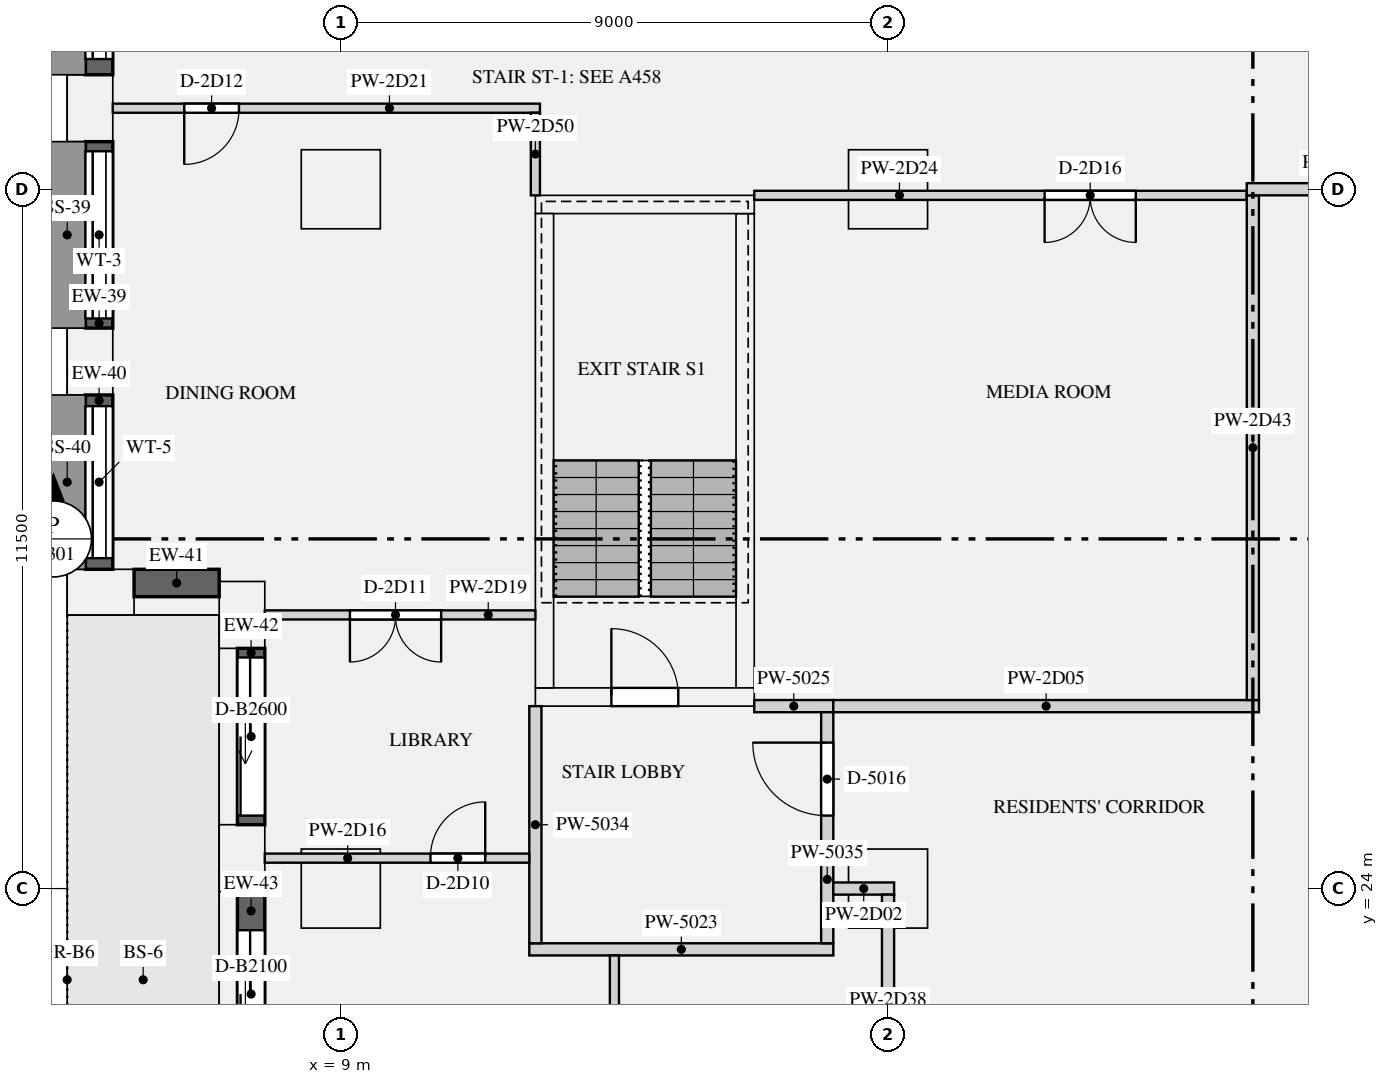
"""IFC4 building model, lengths in metres.
Left out: names, types, materials, properties, quantities, classifications, styles, units other than length and angle.
Written with IfcOpenShell. Run it as: python <this file> out.ifc"""

import sys

from ifc_helpers import new_model, si_unit, direction, frame, frame_2d, origin, origin_2d, place, context, subcontext, project, spatial, rectangle, extrude, element, fill, save


model = new_model("IFC4")
c1 = context("Model", 3, precision=1e-05, world=origin(), true_north=direction((0.0, 1.0)))
c2 = subcontext(c1, "Body", "Model", "MODEL_VIEW")
j1 = project(units=[si_unit("LENGTHUNIT", "METRE"), si_unit("PLANEANGLEUNIT", "RADIAN")], contexts=[c1])
p1 = place(None, origin())
s1 = spatial("IfcSite", under=j1, at=p1, CompositionType="ELEMENT")
p2 = place(p1, origin())
s2 = spatial("IfcBuilding", under=s1, at=p2, CompositionType="ELEMENT")
p3 = place(p2, frame((0.0, 0.0, 111.9)))
s3 = spatial("IfcBuildingStorey", under=s2, at=p3, CompositionType="ELEMENT", Elevation=111.9)
for number, where, z_axis, x_axis in (
    (1, (4.875, 36.833, 0.0), (0.0, 0.0, 1.0), (0.0, -1.0, 0.0)),
    (2, (4.875, 32.667, 0.0), (0.0, 0.0, 1.0), (0.0, -1.0, 0.0)),
    (3, (5.05, 28.875, 0.0), (0.0, 0.0, 1.0), (1.0, 0.0, 0.0)),
    (4, (7.375, 28.5, 0.0), (0.0, 0.0, 1.0), (0.0, -1.0, 0.0)),
    (5, (7.375, 24.5, 0.0), (0.0, 0.0, 1.0), (0.0, -1.0, 0.0)),
):
    element("IfcColumn", number, at=place(p3, frame(where, z_axis=z_axis, x_axis=x_axis)), inside=s3, PredefinedType="USERDEFINED", context=c2, shape_type="SweptSolid", body=[
        extrude(rectangle(XDim=1.1, YDim=0.75, at=origin_2d()), origin(), (0.0, 0.0, 1.0), 3.15),
    ])
for number, where, z_axis, x_axis in (
    (6, (9.0, 24.0, 0.0), (0.0, 0.0, 1.0), (1.0, 0.0, 0.0)),
    (7, (18.0, 24.0, 0.0), (0.0, 0.0, 1.0), (1.0, 0.0, 0.0)),
    (8, (9.0, 35.5, 0.0), (0.0, 0.0, 1.0), (1.0, 0.0, 0.0)),
    (9, (18.0, 35.5, 0.0), (0.0, 0.0, 1.0), (1.0, 0.0, 0.0)),
):
    element("IfcColumn", number, at=place(p3, frame(where, z_axis=z_axis, x_axis=x_axis)), inside=s3, PredefinedType="COLUMN", context=c2, shape_type="SweptSolid", body=[
        extrude(rectangle(XDim=1.3, YDim=1.3, at=origin_2d()), origin(), (0.0, 0.0, 1.0), 3.15),
    ])
p4 = place(p3, frame((12.2, 27.15, 0.0), z_axis=(0.0, 0.0, 1.0), x_axis=(1.0, 0.0, 0.0)))
e10 = element("IfcWall", 10, at=p4, inside=s3, PredefinedType="SHEAR", context=c2, shape_type="SweptSolid", body=[
    extrude(rectangle(XDim=3.6, YDim=0.3, at=frame_2d((1.8, 0.0))), origin(), (0.0, 0.0, 1.0), 3.15),
])
p5 = place(p4, frame((1.25, 0.0, 0.0)))
e11 = element("IfcOpeningElement", 11, at=p5, cuts=e10, PredefinedType="OPENING", context=c2, shape_type="SweptSolid", body=[
    extrude(rectangle(XDim=1.1, YDim=2.1, at=frame_2d((0.55, 1.05))), frame((0.0, 0.16, 0.0), z_axis=(0.0, -1.0, 0.0), x_axis=(1.0, 0.0, 0.0)), (0.0, 0.0, 1.0), 0.32),
])
p6 = place(p3, frame((12.2, 35.25, 0.0), z_axis=(0.0, 0.0, 1.0), x_axis=(1.0, 0.0, 0.0)))
e12 = element("IfcWall", 12, at=p6, inside=s3, PredefinedType="SHEAR", context=c2, shape_type="SweptSolid", body=[
    extrude(rectangle(XDim=3.6, YDim=0.3, at=frame_2d((1.8, 0.0))), origin(), (0.0, 0.0, 1.0), 3.15),
])
for number, where, z_axis, x_axis in (
    (13, (12.35, 27.3, 0.0), (0.0, 0.0, 1.0), (0.0, 1.0, 0.0)),
    (14, (15.65, 27.3, 0.0), (0.0, 0.0, 1.0), (0.0, 1.0, 0.0)),
):
    element("IfcWall", number, at=place(p3, frame(where, z_axis=z_axis, x_axis=x_axis)), inside=s3, PredefinedType="SHEAR", context=c2, shape_type="SweptSolid", body=[
        extrude(rectangle(XDim=7.8, YDim=0.3, at=frame_2d((3.9, 0.0))), origin(), (0.0, 0.0, 1.0), 3.15),
    ])
p7 = place(p3, frame((5.025, 39.9, 0.9), z_axis=(0.0, 0.0, 1.0), x_axis=(0.0, -1.0, 0.0)))
e15 = element("IfcWall", 15, at=p7, inside=s3, PredefinedType="SOLIDWALL", context=c2, shape_type="SweptSolid", body=[
    extrude(rectangle(XDim=2.517, YDim=0.45, at=frame_2d((1.258, 0.0))), origin(), (0.0, 0.0, 1.0), 1.93),
])
p8 = place(p7, frame((0.259, 0.0, 0.15)))
e16 = element("IfcOpeningElement", 16, at=p8, cuts=e15, PredefinedType="OPENING", context=c2, shape_type="SweptSolid", body=[
    extrude(rectangle(XDim=2.0, YDim=1.5, at=frame_2d((1.0, 0.75))), frame((0.0, 0.235, 0.0), z_axis=(0.0, -1.0, 0.0), x_axis=(1.0, 0.0, 0.0)), (0.0, 0.0, 1.0), 0.47),
])
p9 = place(p3, frame((5.025, 36.283, 0.9), z_axis=(0.0, 0.0, 1.0), x_axis=(0.0, -1.0, 0.0)))
e17 = element("IfcWall", 17, at=p9, inside=s3, PredefinedType="SOLIDWALL", context=c2, shape_type="SweptSolid", body=[
    extrude(rectangle(XDim=3.066, YDim=0.45, at=frame_2d((1.533, 0.0))), origin(), (0.0, 0.0, 1.0), 1.93),
])
p10 = place(p9, frame((0.158, 0.0, 0.15)))
e18 = element("IfcOpeningElement", 18, at=p10, cuts=e17, PredefinedType="OPENING", context=c2, shape_type="SweptSolid", body=[
    extrude(rectangle(XDim=2.75, YDim=1.5, at=frame_2d((1.375, 0.75))), frame((0.0, 0.235, 0.0), z_axis=(0.0, -1.0, 0.0), x_axis=(1.0, 0.0, 0.0)), (0.0, 0.0, 1.0), 0.47),
])
p11 = place(p3, frame((5.025, 32.117, 0.9), z_axis=(0.0, 0.0, 1.0), x_axis=(0.0, -1.0, 0.0)))
e19 = element("IfcWall", 19, at=p11, inside=s3, PredefinedType="SOLIDWALL", context=c2, shape_type="SweptSolid", body=[
    extrude(rectangle(XDim=2.867, YDim=0.45, at=frame_2d((1.434, 0.0))), origin(), (0.0, 0.0, 1.0), 1.93),
])
p12 = place(p11, frame((0.184, 0.0, 0.15)))
e20 = element("IfcOpeningElement", 20, at=p12, cuts=e19, PredefinedType="OPENING", context=c2, shape_type="SweptSolid", body=[
    extrude(rectangle(XDim=2.5, YDim=1.5, at=frame_2d((1.25, 0.75))), frame((0.0, 0.235, 0.0), z_axis=(0.0, -1.0, 0.0), x_axis=(1.0, 0.0, 0.0)), (0.0, 0.0, 1.0), 0.47),
])
p13 = place(p3, frame((5.6, 29.025, 0.9), z_axis=(0.0, 0.0, 1.0), x_axis=(1.0, 0.0, 0.0)))
e21 = element("IfcWall", 21, at=p13, inside=s3, PredefinedType="SOLIDWALL", context=c2, shape_type="SweptSolid", body=[
    extrude(rectangle(XDim=1.4, YDim=0.45, at=frame_2d((0.7, 0.0))), origin(), (0.0, 0.0, 1.0), 1.93),
])
p14 = place(p3, frame((7.525, 27.95, 0.0), z_axis=(0.0, 0.0, 1.0), x_axis=(0.0, -1.0, 0.0)))
e22 = element("IfcWall", 22, at=p14, inside=s3, PredefinedType="SOLIDWALL", context=c2, shape_type="SweptSolid", body=[
    extrude(rectangle(XDim=2.9, YDim=0.45, at=frame_2d((1.45, 0.0))), origin(), (0.0, 0.0, 1.0), 2.83),
])
p15 = place(p14, frame((0.15, 0.0, 0.0)))
e23 = element("IfcOpeningElement", 23, at=p15, cuts=e22, PredefinedType="OPENING", context=c2, shape_type="SweptSolid", body=[
    extrude(rectangle(XDim=2.6, YDim=2.3, at=frame_2d((1.3, 1.15))), frame((0.0, 0.235, 0.0), z_axis=(0.0, -1.0, 0.0), x_axis=(1.0, 0.0, 0.0)), (0.0, 0.0, 1.0), 0.47),
])
p16 = place(p3, frame((7.525, 23.95, 0.0), z_axis=(0.0, 0.0, 1.0), x_axis=(0.0, -1.0, 0.0)))
e24 = element("IfcWall", 24, at=p16, inside=s3, PredefinedType="SOLIDWALL", context=c2, shape_type="SweptSolid", body=[
    extrude(rectangle(XDim=2.9, YDim=0.45, at=frame_2d((1.45, 0.0))), origin(), (0.0, 0.0, 1.0), 2.83),
])
p17 = place(p16, frame((0.635, 0.0, 0.0)))
e25 = element("IfcOpeningElement", 25, at=p17, cuts=e24, PredefinedType="OPENING", context=c2, shape_type="SweptSolid", body=[
    extrude(rectangle(XDim=2.1, YDim=2.3, at=frame_2d((1.05, 1.15))), frame((0.0, 0.235, 0.0), z_axis=(0.0, -1.0, 0.0), x_axis=(1.0, 0.0, 0.0)), (0.0, 0.0, 1.0), 0.47),
])
p18 = place(p3, frame((12.1, 23.0, 0.0), z_axis=(0.0, 0.0, 1.0), x_axis=(1.0, 0.0, 0.0)))
e26 = element("IfcWall", 26, at=p18, inside=s3, PredefinedType="PARTITIONING", context=c2, shape_type="SweptSolid", body=[
    extrude(rectangle(XDim=5.0, YDim=0.2, at=frame_2d((2.5, 0.0))), origin(), (0.0, 0.0, 1.0), 2.83),
])
p19 = place(p3, frame((15.8, 27.0, 0.0), z_axis=(0.0, 0.0, 1.0), x_axis=(1.0, 0.0, 0.0)))
e27 = element("IfcWall", 27, at=p19, inside=s3, PredefinedType="PARTITIONING", context=c2, shape_type="SweptSolid", body=[
    extrude(rectangle(XDim=1.3, YDim=0.2, at=frame_2d((0.65, 0.0))), origin(), (0.0, 0.0, 1.0), 2.83),
])
p20 = place(p3, frame((12.2, 23.1, 0.0), z_axis=(0.0, 0.0, 1.0), x_axis=(0.0, 1.0, 0.0)))
e28 = element("IfcWall", 28, at=p20, inside=s3, PredefinedType="PARTITIONING", context=c2, shape_type="SweptSolid", body=[
    extrude(rectangle(XDim=3.9, YDim=0.2, at=frame_2d((1.95, 0.0))), origin(), (0.0, 0.0, 1.0), 2.83),
])
p21 = place(p3, frame((17.0, 23.1, 0.0), z_axis=(0.0, 0.0, 1.0), x_axis=(0.0, 1.0, 0.0)))
e29 = element("IfcWall", 29, at=p21, inside=s3, PredefinedType="PARTITIONING", context=c2, shape_type="SweptSolid", body=[
    extrude(rectangle(XDim=3.8, YDim=0.2, at=frame_2d((1.9, 0.0))), origin(), (0.0, 0.0, 1.0), 2.83),
])
p22 = place(p21, frame((2.1, 0.0, 0.0)))
e30 = element("IfcOpeningElement", 30, at=p22, cuts=e29, PredefinedType="OPENING", context=c2, shape_type="SweptSolid", body=[
    extrude(rectangle(XDim=1.2, YDim=2.1, at=frame_2d((0.6, 1.05))), frame((0.0, 0.11, 0.0), z_axis=(0.0, -1.0, 0.0), x_axis=(1.0, 0.0, 0.0)), (0.0, 0.0, 1.0), 0.22),
])
p23 = place(p3, frame((17.1, 24.0, 0.0), z_axis=(0.0, 0.0, 1.0), x_axis=(1.0, 0.0, 0.0)))
e31 = element("IfcWall", 31, at=p23, inside=s3, PredefinedType="PARTITIONING", context=c2, shape_type="SweptSolid", body=[
    extrude(rectangle(XDim=1.0, YDim=0.2, at=frame_2d((0.5, 0.0))), origin(), (0.0, 0.0, 1.0), 2.83),
])
p24 = place(p3, frame((17.1, 27.0, 0.0), z_axis=(0.0, 0.0, 1.0), x_axis=(1.0, 0.0, 0.0)))
e32 = element("IfcWall", 32, at=p24, inside=s3, PredefinedType="PARTITIONING", context=c2, shape_type="SweptSolid", body=[
    extrude(rectangle(XDim=7.0, YDim=0.2, at=frame_2d((3.5, 0.0))), origin(), (0.0, 0.0, 1.0), 2.83),
])
p25 = place(p3, frame((23.9, 35.5, 0.0), z_axis=(0.0, 0.0, 1.0), x_axis=(1.0, 0.0, 0.0)))
e33 = element("IfcWall", 33, at=p25, inside=s3, PredefinedType="PARTITIONING", context=c2, shape_type="SweptSolid", body=[
    extrude(rectangle(XDim=3.1, YDim=0.2, at=frame_2d((1.55, 0.0))), origin(), (0.0, 0.0, 1.0), 2.83),
])
p26 = place(p3, frame((7.75, 24.5, 0.0), z_axis=(0.0, 0.0, 1.0), x_axis=(1.0, 0.0, 0.0)))
e34 = element("IfcWall", 34, at=p26, inside=s3, PredefinedType="PARTITIONING", context=c2, shape_type="SweptSolid", body=[
    extrude(rectangle(XDim=4.35, YDim=0.15, at=frame_2d((2.175, 0.0))), origin(), (0.0, 0.0, 1.0), 2.83),
])
p27 = place(p26, frame((2.725, 0.0, 0.0)))
e35 = element("IfcOpeningElement", 35, at=p27, cuts=e34, PredefinedType="OPENING", context=c2, shape_type="SweptSolid", body=[
    extrude(rectangle(XDim=0.9, YDim=2.1, at=frame_2d((0.45, 1.05))), frame((0.0, 0.085, 0.0), z_axis=(0.0, -1.0, 0.0), x_axis=(1.0, 0.0, 0.0)), (0.0, 0.0, 1.0), 0.17),
])
p28 = place(p3, frame((7.75, 28.5, 0.0), z_axis=(0.0, 0.0, 1.0), x_axis=(1.0, 0.0, 0.0)))
e36 = element("IfcWall", 36, at=p28, inside=s3, PredefinedType="PARTITIONING", context=c2, shape_type="SweptSolid", body=[
    extrude(rectangle(XDim=4.45, YDim=0.15, at=frame_2d((2.225, 0.0))), origin(), (0.0, 0.0, 1.0), 2.83),
])
p29 = place(p28, frame((1.4, 0.0, 0.0)))
e37 = element("IfcOpeningElement", 37, at=p29, cuts=e36, PredefinedType="OPENING", context=c2, shape_type="SweptSolid", body=[
    extrude(rectangle(XDim=1.5, YDim=2.1, at=frame_2d((0.75, 1.05))), frame((0.0, 0.085, 0.0), z_axis=(0.0, -1.0, 0.0), x_axis=(1.0, 0.0, 0.0)), (0.0, 0.0, 1.0), 0.17),
])
p30 = place(p3, frame((5.25, 36.833, 0.0), z_axis=(0.0, 0.0, 1.0), x_axis=(1.0, 0.0, 0.0)))
e38 = element("IfcWall", 38, at=p30, inside=s3, PredefinedType="PARTITIONING", context=c2, shape_type="SweptSolid", body=[
    extrude(rectangle(XDim=7.025, YDim=0.15, at=frame_2d((3.512, 0.0))), origin(), (0.0, 0.0, 1.0), 2.83),
])
p31 = place(p30, frame((1.175, 0.0, 0.0)))
e39 = element("IfcOpeningElement", 39, at=p31, cuts=e38, PredefinedType="OPENING", context=c2, shape_type="SweptSolid", body=[
    extrude(rectangle(XDim=0.9, YDim=2.1, at=frame_2d((0.45, 1.05))), frame((0.0, 0.085, 0.0), z_axis=(0.0, -1.0, 0.0), x_axis=(1.0, 0.0, 0.0)), (0.0, 0.0, 1.0), 0.17),
])
p32 = place(p3, frame((15.8, 35.4, 0.0), z_axis=(0.0, 0.0, 1.0), x_axis=(1.0, 0.0, 0.0)))
e40 = element("IfcWall", 40, at=p32, inside=s3, PredefinedType="PARTITIONING", context=c2, shape_type="SweptSolid", body=[
    extrude(rectangle(XDim=8.1, YDim=0.15, at=frame_2d((4.05, 0.0))), origin(), (0.0, 0.0, 1.0), 2.83),
])
p33 = place(p32, frame((4.775, 0.0, 0.0)))
e41 = element("IfcOpeningElement", 41, at=p33, cuts=e40, PredefinedType="OPENING", context=c2, shape_type="SweptSolid", body=[
    extrude(rectangle(XDim=1.5, YDim=2.1, at=frame_2d((0.75, 1.05))), frame((0.0, 0.085, 0.0), z_axis=(0.0, -1.0, 0.0), x_axis=(1.0, 0.0, 0.0)), (0.0, 0.0, 1.0), 0.17),
])
p34 = place(p3, frame((18.0, 16.1, 0.0), z_axis=(0.0, 0.0, 1.0), x_axis=(0.0, 1.0, 0.0)))
e42 = element("IfcWall", 42, at=p34, inside=s3, PredefinedType="PARTITIONING", context=c2, shape_type="SweptSolid", body=[
    extrude(rectangle(XDim=7.8, YDim=0.2, at=frame_2d((3.9, 0.0))), origin(), (0.0, 0.0, 1.0), 2.83),
])
p35 = place(p34, frame((2.35, 0.0, 0.0)))
e43 = element("IfcOpeningElement", 43, at=p35, cuts=e42, PredefinedType="OPENING", context=c2, shape_type="SweptSolid", body=[
    extrude(rectangle(XDim=1.1, YDim=2.1, at=frame_2d((0.55, 1.05))), frame((0.0, 0.11, 0.0), z_axis=(0.0, -1.0, 0.0), x_axis=(1.0, 0.0, 0.0)), (0.0, 0.0, 1.0), 0.22),
])
p36 = place(p3, frame((24.0, 27.1, 0.0), z_axis=(0.0, 0.0, 1.0), x_axis=(0.0, 1.0, 0.0)))
e44 = element("IfcWall", 44, at=p36, inside=s3, PredefinedType="PARTITIONING", context=c2, shape_type="SweptSolid", body=[
    extrude(rectangle(XDim=8.3, YDim=0.2, at=frame_2d((4.15, 0.0))), origin(), (0.0, 0.0, 1.0), 2.83),
])
p37 = place(p3, frame((13.5, 12.575, 0.0), z_axis=(0.0, 0.0, 1.0), x_axis=(0.0, 1.0, 0.0)))
e45 = element("IfcWall", 45, at=p37, inside=s3, PredefinedType="PARTITIONING", context=c2, shape_type="SweptSolid", body=[
    extrude(rectangle(XDim=10.325, YDim=0.15, at=frame_2d((5.163, 0.0))), origin(), (0.0, 0.0, 1.0), 2.83),
])
p38 = place(p37, frame((1.475, 0.0, 0.0)))
e46 = element("IfcOpeningElement", 46, at=p38, cuts=e45, PredefinedType="OPENING", context=c2, shape_type="SweptSolid", body=[
    extrude(rectangle(XDim=0.9, YDim=2.1, at=frame_2d((0.45, 1.05))), frame((0.0, 0.085, 0.0), z_axis=(0.0, -1.0, 0.0), x_axis=(1.0, 0.0, 0.0)), (0.0, 0.0, 1.0), 0.17),
])
p39 = place(p37, frame((6.45, 0.0, 0.0)))
e47 = element("IfcOpeningElement", 47, at=p39, cuts=e45, PredefinedType="OPENING", context=c2, shape_type="SweptSolid", body=[
    extrude(rectangle(XDim=1.5, YDim=2.1, at=frame_2d((0.75, 1.05))), frame((0.0, 0.085, 0.0), z_axis=(0.0, -1.0, 0.0), x_axis=(1.0, 0.0, 0.0)), (0.0, 0.0, 1.0), 0.17),
])
p40 = place(p3, frame((12.2, 35.4, 0.0), z_axis=(0.0, 0.0, 1.0), x_axis=(0.0, 1.0, 0.0)))
e48 = element("IfcWall", 48, at=p40, inside=s3, PredefinedType="PARTITIONING", context=c2, shape_type="SweptSolid", body=[
    extrude(rectangle(XDim=1.358, YDim=0.15, at=frame_2d((0.679, 0.0))), origin(), (0.0, 0.0, 1.0), 2.83),
])
p41 = place(p8, origin())
e49 = element("IfcWindow", 49, at=p41, inside=s3, PartitioningType="SINGLE_PANEL", PredefinedType="WINDOW", context=c2, shape_type="SweptSolid", body=[
    extrude(rectangle(XDim=2.0, YDim=1.5, at=frame_2d((1.0, 0.75))), frame((0.0, -0.065, 0.0), z_axis=(0.0, -1.0, 0.0), x_axis=(1.0, 0.0, 0.0)), (0.0, 0.0, 1.0), 0.06),
])
fill(e16, e49)
p42 = place(p10, origin())
e50 = element("IfcWindow", 50, at=p42, inside=s3, PartitioningType="SINGLE_PANEL", PredefinedType="WINDOW", context=c2, shape_type="SweptSolid", body=[
    extrude(rectangle(XDim=2.75, YDim=1.5, at=frame_2d((1.375, 0.75))), frame((0.0, -0.065, 0.0), z_axis=(0.0, -1.0, 0.0), x_axis=(1.0, 0.0, 0.0)), (0.0, 0.0, 1.0), 0.06),
])
fill(e18, e50)
p43 = place(p12, origin())
e51 = element("IfcWindow", 51, at=p43, inside=s3, PartitioningType="SINGLE_PANEL", PredefinedType="WINDOW", context=c2, shape_type="SweptSolid", body=[
    extrude(rectangle(XDim=2.5, YDim=1.5, at=frame_2d((1.25, 0.75))), frame((0.0, -0.065, 0.0), z_axis=(0.0, -1.0, 0.0), x_axis=(1.0, 0.0, 0.0)), (0.0, 0.0, 1.0), 0.06),
])
fill(e20, e51)
p44 = place(p15, origin())
e52 = element("IfcDoor", 52, at=p44, inside=s3, OperationType="SLIDING_TO_LEFT", PredefinedType="DOOR", context=c2, shape_type="SweptSolid", body=[
    extrude(rectangle(XDim=2.6, YDim=2.3, at=frame_2d((1.3, 1.15))), frame((0.0, -0.07, 0.0), z_axis=(0.0, -1.0, 0.0), x_axis=(1.0, 0.0, 0.0)), (0.0, 0.0, 1.0), 0.05),
])
fill(e23, e52)
p45 = place(p17, origin())
e53 = element("IfcDoor", 53, at=p45, inside=s3, OperationType="SLIDING_TO_LEFT", PredefinedType="DOOR", context=c2, shape_type="SweptSolid", body=[
    extrude(rectangle(XDim=2.1, YDim=2.3, at=frame_2d((1.05, 1.15))), frame((0.0, -0.07, 0.0), z_axis=(0.0, -1.0, 0.0), x_axis=(1.0, 0.0, 0.0)), (0.0, 0.0, 1.0), 0.05),
])
fill(e25, e53)
p46 = place(p5, origin())
e54 = element("IfcDoor", 54, at=p46, inside=s3, OperationType="SINGLE_SWING_LEFT", PredefinedType="DOOR", context=c2, shape_type="SweptSolid", body=[
    extrude(rectangle(XDim=1.1, YDim=2.1, at=frame_2d((0.55, 1.05))), frame((0.0, 0.025, 0.0), z_axis=(0.0, -1.0, 0.0), x_axis=(1.0, 0.0, 0.0)), (0.0, 0.0, 1.0), 0.05),
])
fill(e11, e54)
p47 = place(p22, origin())
e55 = element("IfcDoor", 55, at=p47, inside=s3, OperationType="SINGLE_SWING_RIGHT", PredefinedType="DOOR", context=c2, shape_type="SweptSolid", body=[
    extrude(rectangle(XDim=1.2, YDim=2.1, at=frame_2d((0.6, 1.05))), frame((0.0, 0.025, 0.0), z_axis=(0.0, -1.0, 0.0), x_axis=(1.0, 0.0, 0.0)), (0.0, 0.0, 1.0), 0.05),
])
fill(e30, e55)
p48 = place(p27, origin())
e56 = element("IfcDoor", 56, at=p48, inside=s3, OperationType="SINGLE_SWING_RIGHT", PredefinedType="DOOR", context=c2, shape_type="SweptSolid", body=[
    extrude(rectangle(XDim=0.9, YDim=2.1, at=frame_2d((0.45, 1.05))), frame((0.0, 0.025, 0.0), z_axis=(0.0, -1.0, 0.0), x_axis=(1.0, 0.0, 0.0)), (0.0, 0.0, 1.0), 0.05),
])
fill(e35, e56)
p49 = place(p29, frame((1.5, 0.0, 0.0), z_axis=(0.0, 0.0, 1.0), x_axis=(-1.0, 0.0, 0.0)))
e57 = element("IfcDoor", 57, at=p49, inside=s3, OperationType="DOUBLE_DOOR_SINGLE_SWING", PredefinedType="DOOR", context=c2, shape_type="SweptSolid", body=[
    extrude(rectangle(XDim=1.5, YDim=2.1, at=frame_2d((0.75, 1.05))), frame((0.0, 0.025, 0.0), z_axis=(0.0, -1.0, 0.0), x_axis=(1.0, 0.0, 0.0)), (0.0, 0.0, 1.0), 0.05),
])
fill(e37, e57)
p50 = place(p31, frame((0.9, 0.0, 0.0), z_axis=(0.0, 0.0, 1.0), x_axis=(-1.0, 0.0, 0.0)))
e58 = element("IfcDoor", 58, at=p50, inside=s3, OperationType="SINGLE_SWING_RIGHT", PredefinedType="DOOR", context=c2, shape_type="SweptSolid", body=[
    extrude(rectangle(XDim=0.9, YDim=2.1, at=frame_2d((0.45, 1.05))), frame((0.0, 0.025, 0.0), z_axis=(0.0, -1.0, 0.0), x_axis=(1.0, 0.0, 0.0)), (0.0, 0.0, 1.0), 0.05),
])
fill(e39, e58)
p51 = place(p33, frame((1.5, 0.0, 0.0), z_axis=(0.0, 0.0, 1.0), x_axis=(-1.0, 0.0, 0.0)))
e59 = element("IfcDoor", 59, at=p51, inside=s3, OperationType="DOUBLE_DOOR_SINGLE_SWING", PredefinedType="DOOR", context=c2, shape_type="SweptSolid", body=[
    extrude(rectangle(XDim=1.5, YDim=2.1, at=frame_2d((0.75, 1.05))), frame((0.0, 0.025, 0.0), z_axis=(0.0, -1.0, 0.0), x_axis=(1.0, 0.0, 0.0)), (0.0, 0.0, 1.0), 0.05),
])
fill(e41, e59)
save(model, sys.argv[1])
